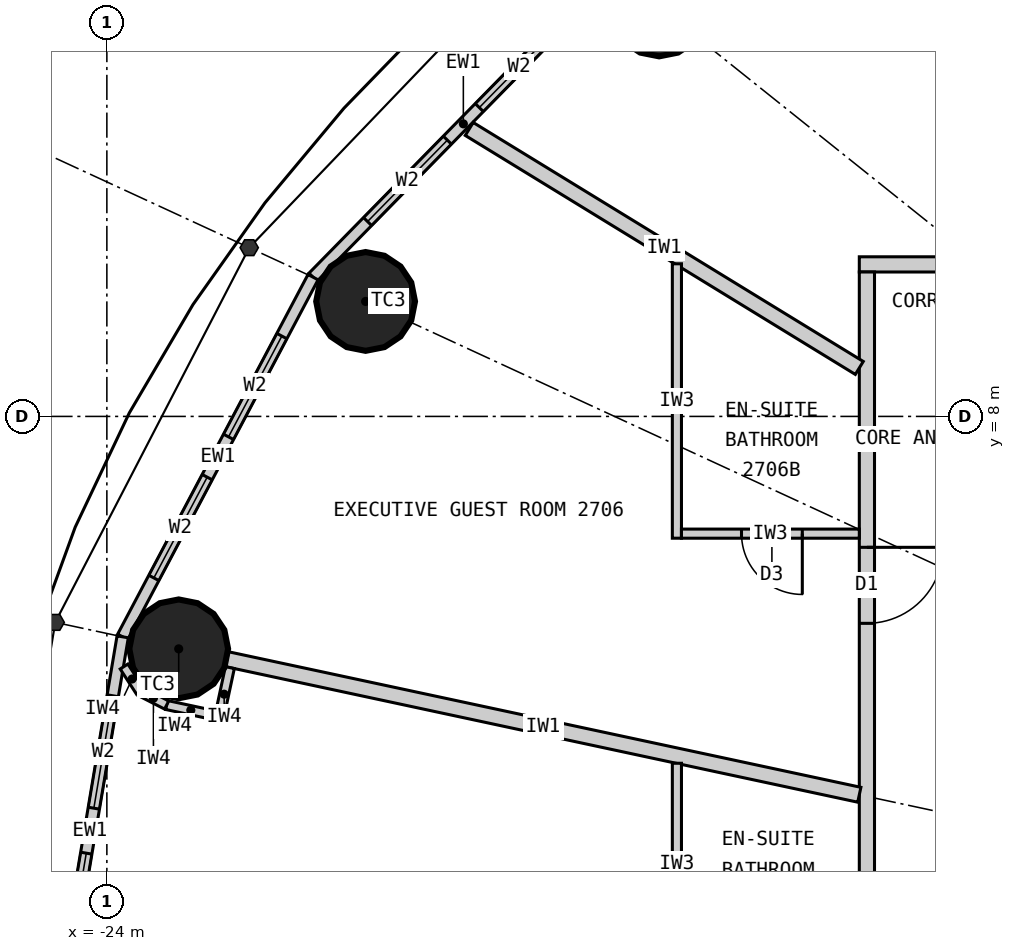
"""IFC4 building model, lengths in metres.
Left out: names, types, materials, properties, quantities, classifications, styles, units other than length and angle.
Written with IfcOpenShell. Run it as: python <this file> out.ifc"""

import sys

from ifc_helpers import new_model, si_unit, direction, frame, frame_2d, origin, origin_2d, place, context, subcontext, project, spatial, rectangle, circle, extrude, element, fill, save


model = new_model("IFC4")
c1 = context("Model", 3, precision=1e-05, world=origin(), true_north=direction((0.0, 1.0)))
c2 = subcontext(c1, "Body", "Model", "MODEL_VIEW")
j1 = project(units=[si_unit("LENGTHUNIT", "METRE"), si_unit("PLANEANGLEUNIT", "RADIAN")], contexts=[c1])
p1 = place(None, origin())
s1 = spatial("IfcSite", under=j1, at=p1, CompositionType="ELEMENT")
p2 = place(p1, origin())
s2 = spatial("IfcBuilding", under=s1, at=p2, CompositionType="ELEMENT")
p3 = place(p2, frame((0.0, 0.0, 108.9)))
s3 = spatial("IfcBuildingStorey", under=s2, at=p3, CompositionType="ELEMENT", Elevation=108.9)
for number, where, z_axis, x_axis in (
    (1, (-16.734, 13.387, 0.0), (0.0, 0.0, 1.0), (1.0, 0.0, 0.0)),
    (2, (-20.596, 9.513, 0.0), (0.0, 0.0, 1.0), (1.0, 0.0, 0.0)),
    (3, (-23.055, 4.942, 0.0), (0.0, 0.0, 1.0), (1.0, 0.0, 0.0)),
):
    element("IfcColumn", number, at=place(p3, frame(where, z_axis=z_axis, x_axis=x_axis)), inside=s3, PredefinedType="COLUMN", context=c2, shape_type="SweptSolid", body=[
        extrude(circle(Radius=0.65, at=origin_2d()), origin(), (0.0, 0.0, 1.0), 3.3),
    ])
p4 = place(p3, frame((-17.332, 13.866, 0.0), z_axis=(0.0, 0.0, 1.0), x_axis=(-0.700136650834, -0.714008872605, 0.0)))
e4 = element("IfcWall", 4, at=p4, inside=s3, PredefinedType="ELEMENTEDWALL", context=c2, shape_type="SweptSolid", body=[
    extrude(rectangle(XDim=5.649, YDim=0.15, at=frame_2d((2.825, 0.0))), origin(), (0.0, 0.0, 1.0), 3.12),
])
p5 = place(p4, frame((1.025, 0.0, 0.9)))
e5 = element("IfcOpeningElement", 5, at=p5, cuts=e4, PredefinedType="OPENING", context=c2, shape_type="SweptSolid", body=[
    extrude(rectangle(XDim=1.5, YDim=1.9, at=frame_2d((0.75, 0.95))), frame((0.0, 0.085, 0.0), z_axis=(0.0, -1.0, 0.0), x_axis=(1.0, 0.0, 0.0)), (0.0, 0.0, 1.0), 0.17),
])
p6 = place(p4, frame((3.125, 0.0, 0.9)))
e6 = element("IfcOpeningElement", 6, at=p6, cuts=e4, PredefinedType="OPENING", context=c2, shape_type="SweptSolid", body=[
    extrude(rectangle(XDim=1.5, YDim=1.9, at=frame_2d((0.75, 0.95))), frame((0.0, 0.085, 0.0), z_axis=(0.0, -1.0, 0.0), x_axis=(1.0, 0.0, 0.0)), (0.0, 0.0, 1.0), 0.17),
])
p7 = place(p3, frame((-21.287, 9.832, 0.0), z_axis=(0.0, 0.0, 1.0), x_axis=(-0.467814388454, -0.883826735257, 0.0)))
e7 = element("IfcWall", 7, at=p7, inside=s3, PredefinedType="ELEMENTEDWALL", context=c2, shape_type="SweptSolid", body=[
    extrude(rectangle(XDim=5.354, YDim=0.15, at=frame_2d((2.677, 0.0))), origin(), (0.0, 0.0, 1.0), 3.12),
])
p8 = place(p7, frame((0.877, 0.0, 0.9)))
e8 = element("IfcOpeningElement", 8, at=p8, cuts=e7, PredefinedType="OPENING", context=c2, shape_type="SweptSolid", body=[
    extrude(rectangle(XDim=1.5, YDim=1.9, at=frame_2d((0.75, 0.95))), frame((0.0, 0.085, 0.0), z_axis=(0.0, -1.0, 0.0), x_axis=(1.0, 0.0, 0.0)), (0.0, 0.0, 1.0), 0.17),
])
p9 = place(p7, frame((2.977, 0.0, 0.9)))
e9 = element("IfcOpeningElement", 9, at=p9, cuts=e7, PredefinedType="OPENING", context=c2, shape_type="SweptSolid", body=[
    extrude(rectangle(XDim=1.5, YDim=1.9, at=frame_2d((0.75, 0.95))), frame((0.0, 0.085, 0.0), z_axis=(0.0, -1.0, 0.0), x_axis=(1.0, 0.0, 0.0)), (0.0, 0.0, 1.0), 0.17),
])
p10 = place(p3, frame((-23.792, 5.1, 0.0), z_axis=(0.0, 0.0, 1.0), x_axis=(-0.165883894218, -0.986145290329, 0.0)))
e10 = element("IfcWall", 10, at=p10, inside=s3, PredefinedType="ELEMENTEDWALL", context=c2, shape_type="SweptSolid", body=[
    extrude(rectangle(XDim=5.172, YDim=0.15, at=frame_2d((2.586, 0.0))), origin(), (0.0, 0.0, 1.0), 3.12),
])
p11 = place(p10, frame((0.786, 0.0, 0.9)))
e11 = element("IfcOpeningElement", 11, at=p11, cuts=e10, PredefinedType="OPENING", context=c2, shape_type="SweptSolid", body=[
    extrude(rectangle(XDim=1.5, YDim=1.9, at=frame_2d((0.75, 0.95))), frame((0.0, 0.085, 0.0), z_axis=(0.0, -1.0, 0.0), x_axis=(1.0, 0.0, 0.0)), (0.0, 0.0, 1.0), 0.17),
])
p12 = place(p10, frame((2.886, 0.0, 0.9)))
e12 = element("IfcOpeningElement", 12, at=p12, cuts=e10, PredefinedType="OPENING", context=c2, shape_type="SweptSolid", body=[
    extrude(rectangle(XDim=1.5, YDim=1.9, at=frame_2d((0.75, 0.95))), frame((0.0, 0.085, 0.0), z_axis=(0.0, -1.0, 0.0), x_axis=(1.0, 0.0, 0.0)), (0.0, 0.0, 1.0), 0.17),
])
p13 = place(p3, frame((-14.1, 10.0, 0.0), z_axis=(0.0, 0.0, 1.0), x_axis=(1.0, 0.0, 0.0)))
e13 = element("IfcWall", 13, at=p13, inside=s3, PredefinedType="PARTITIONING", context=c2, shape_type="SweptSolid", body=[
    extrude(rectangle(XDim=12.535, YDim=0.2, at=frame_2d((6.268, 0.0))), origin(), (0.0, 0.0, 1.0), 3.12),
])
p14 = place(p13, frame((2.801, 0.0, 0.0)))
e14 = element("IfcOpeningElement", 14, at=p14, cuts=e13, PredefinedType="OPENING", context=c2, shape_type="SweptSolid", body=[
    extrude(rectangle(XDim=1.0, YDim=2.2, at=frame_2d((0.5, 1.1))), frame((0.0, 0.11, 0.0), z_axis=(0.0, -1.0, 0.0), x_axis=(1.0, 0.0, 0.0)), (0.0, 0.0, 1.0), 0.22),
])
p15 = place(p3, frame((-14.0, 9.9, 0.0), z_axis=(0.0, 0.0, 1.0), x_axis=(0.0, -1.0, 0.0)))
e15 = element("IfcWall", 15, at=p15, inside=s3, PredefinedType="PARTITIONING", context=c2, shape_type="SweptSolid", body=[
    extrude(rectangle(XDim=19.8, YDim=0.2, at=frame_2d((9.9, 0.0))), origin(), (0.0, 0.0, 1.0), 3.12),
])
p16 = place(p15, frame((3.622, 0.0, 0.0)))
e16 = element("IfcOpeningElement", 16, at=p16, cuts=e15, PredefinedType="OPENING", context=c2, shape_type="SweptSolid", body=[
    extrude(rectangle(XDim=1.0, YDim=2.2, at=frame_2d((0.5, 1.1))), frame((0.0, 0.11, 0.0), z_axis=(0.0, -1.0, 0.0), x_axis=(1.0, 0.0, 0.0)), (0.0, 0.0, 1.0), 0.22),
])
p17 = place(p15, frame((9.238, 0.0, 0.0)))
e17 = element("IfcOpeningElement", 17, at=p17, cuts=e15, PredefinedType="OPENING", context=c2, shape_type="SweptSolid", body=[
    extrude(rectangle(XDim=1.0, YDim=2.2, at=frame_2d((0.5, 1.1))), frame((0.0, 0.11, 0.0), z_axis=(0.0, -1.0, 0.0), x_axis=(1.0, 0.0, 0.0)), (0.0, 0.0, 1.0), 0.22),
])
p18 = place(p15, frame((13.742, 0.0, 0.0)))
e18 = element("IfcOpeningElement", 18, at=p18, cuts=e15, PredefinedType="OPENING", context=c2, shape_type="SweptSolid", body=[
    extrude(rectangle(XDim=1.0, YDim=2.2, at=frame_2d((0.5, 1.1))), frame((0.0, 0.11, 0.0), z_axis=(0.0, -1.0, 0.0), x_axis=(1.0, 0.0, 0.0)), (0.0, 0.0, 1.0), 0.22),
])
p19 = place(p15, frame((18.698, 0.0, 0.0)))
e19 = element("IfcOpeningElement", 19, at=p19, cuts=e15, PredefinedType="OPENING", context=c2, shape_type="SweptSolid", body=[
    extrude(rectangle(XDim=1.0, YDim=2.2, at=frame_2d((0.5, 1.1))), frame((0.0, 0.11, 0.0), z_axis=(0.0, -1.0, 0.0), x_axis=(1.0, 0.0, 0.0)), (0.0, 0.0, 1.0), 0.22),
])
p20 = place(p3, frame((-14.1, 8.638, 0.0), z_axis=(0.0, 0.0, 1.0), x_axis=(-0.852706758009, 0.5223898782, 0.0)))
e20 = element("IfcWall", 20, at=p20, inside=s3, PredefinedType="PARTITIONING", context=c2, shape_type="SweptSolid", body=[
    extrude(rectangle(XDim=6.019, YDim=0.2, at=frame_2d((3.009, 0.0))), origin(), (0.0, 0.0, 1.0), 3.12),
])
p21 = place(p3, frame((-14.1, 3.022, 0.0), z_axis=(0.0, 0.0, 1.0), x_axis=(-0.977783513367, 0.209617272638, 0.0)))
e21 = element("IfcWall", 21, at=p21, inside=s3, PredefinedType="PARTITIONING", context=c2, shape_type="SweptSolid", body=[
    extrude(rectangle(XDim=8.508, YDim=0.2, at=frame_2d((4.254, 0.0))), origin(), (0.0, 0.0, 1.0), 2.37),
])
p22 = place(p3, frame((-16.5, 10.008, 0.0), z_axis=(0.0, 0.0, 1.0), x_axis=(0.0, -1.0, 0.0)))
e22 = element("IfcWall", 22, at=p22, inside=s3, PredefinedType="PARTITIONING", context=c2, shape_type="SweptSolid", body=[
    extrude(rectangle(XDim=3.61, YDim=0.12, at=frame_2d((1.805, 0.0))), origin(), (0.0, 0.0, 1.0), 3.12),
])
p23 = place(p3, frame((-14.1, 6.458, 0.0), z_axis=(0.0, 0.0, 1.0), x_axis=(-1.0, 0.0, 0.0)))
e23 = element("IfcWall", 23, at=p23, inside=s3, PredefinedType="PARTITIONING", context=c2, shape_type="SweptSolid", body=[
    extrude(rectangle(XDim=2.34, YDim=0.12, at=frame_2d((1.17, 0.0))), origin(), (0.0, 0.0, 1.0), 3.12),
])
p24 = place(p23, frame((0.75, 0.0, 0.0)))
e24 = element("IfcOpeningElement", 24, at=p24, cuts=e23, PredefinedType="OPENING", context=c2, shape_type="SweptSolid", body=[
    extrude(rectangle(XDim=0.8, YDim=2.1, at=frame_2d((0.4, 1.05))), frame((0.0, 0.07, 0.0), z_axis=(0.0, -1.0, 0.0), x_axis=(1.0, 0.0, 0.0)), (0.0, 0.0, 1.0), 0.14),
])
p25 = place(p3, frame((-16.5, 3.437, 0.0), z_axis=(0.0, 0.0, 1.0), x_axis=(0.0, -1.0, 0.0)))
e25 = element("IfcWall", 25, at=p25, inside=s3, PredefinedType="PARTITIONING", context=c2, shape_type="SweptSolid", body=[
    extrude(rectangle(XDim=2.655, YDim=0.12, at=frame_2d((1.327, 0.0))), origin(), (0.0, 0.0, 1.0), 3.12),
])
p26 = place(p3, frame((-22.382, 4.695, 0.0), z_axis=(0.0, 0.0, 1.0), x_axis=(-0.209808658628, -0.977742464438, 0.0)))
e26 = element("IfcWall", 26, at=p26, inside=s3, PredefinedType="PARTITIONING", context=c2, shape_type="SweptSolid", body=[
    extrude(rectangle(XDim=0.716, YDim=0.12, at=frame_2d((0.358, 0.0))), origin(), (0.0, 0.0, 1.0), 3.12),
])
p27 = place(p3, frame((-22.578, 4.067, 0.0), z_axis=(0.0, 0.0, 1.0), x_axis=(-0.977802414077, 0.209529088731, 0.0)))
e27 = element("IfcWall", 27, at=p27, inside=s3, PredefinedType="PARTITIONING", context=c2, shape_type="SweptSolid", body=[
    extrude(rectangle(XDim=0.65, YDim=0.12, at=frame_2d((0.325, 0.0))), origin(), (0.0, 0.0, 1.0), 3.12),
])
for number, where, z_axis, x_axis in (
    (28, (-23.213, 4.203, 0.0), (0.0, 0.0, 1.0), (-0.89, 0.456, 0.0)),
    (29, (-23.562, 4.381, 0.0), (0.0, 0.0, 1.0), (-0.543, 0.84, 0.0)),
):
    element("IfcWall", number, at=place(p3, frame(where, z_axis=z_axis, x_axis=x_axis)), inside=s3, PredefinedType="PARTITIONING", context=c2, shape_type="SweptSolid", body=[
        extrude(rectangle(XDim=0.391, YDim=0.12, at=frame_2d((0.196, 0.0))), origin(), (0.0, 0.0, 1.0), 3.12),
    ])
p28 = place(p5, origin())
e30 = element("IfcWindow", 30, at=p28, inside=s3, PartitioningType="SINGLE_PANEL", PredefinedType="WINDOW", context=c2, shape_type="SweptSolid", body=[
    extrude(rectangle(XDim=1.5, YDim=1.9, at=frame_2d((0.75, 0.95))), frame((0.0, 0.03, 0.0), z_axis=(0.0, -1.0, 0.0), x_axis=(1.0, 0.0, 0.0)), (0.0, 0.0, 1.0), 0.06),
])
fill(e5, e30)
p29 = place(p6, origin())
e31 = element("IfcWindow", 31, at=p29, inside=s3, PartitioningType="SINGLE_PANEL", PredefinedType="WINDOW", context=c2, shape_type="SweptSolid", body=[
    extrude(rectangle(XDim=1.5, YDim=1.9, at=frame_2d((0.75, 0.95))), frame((0.0, 0.03, 0.0), z_axis=(0.0, -1.0, 0.0), x_axis=(1.0, 0.0, 0.0)), (0.0, 0.0, 1.0), 0.06),
])
fill(e6, e31)
p30 = place(p8, origin())
e32 = element("IfcWindow", 32, at=p30, inside=s3, PartitioningType="SINGLE_PANEL", PredefinedType="WINDOW", context=c2, shape_type="SweptSolid", body=[
    extrude(rectangle(XDim=1.5, YDim=1.9, at=frame_2d((0.75, 0.95))), frame((0.0, 0.03, 0.0), z_axis=(0.0, -1.0, 0.0), x_axis=(1.0, 0.0, 0.0)), (0.0, 0.0, 1.0), 0.06),
])
fill(e8, e32)
p31 = place(p9, origin())
e33 = element("IfcWindow", 33, at=p31, inside=s3, PartitioningType="SINGLE_PANEL", PredefinedType="WINDOW", context=c2, shape_type="SweptSolid", body=[
    extrude(rectangle(XDim=1.5, YDim=1.9, at=frame_2d((0.75, 0.95))), frame((0.0, 0.03, 0.0), z_axis=(0.0, -1.0, 0.0), x_axis=(1.0, 0.0, 0.0)), (0.0, 0.0, 1.0), 0.06),
])
fill(e9, e33)
p32 = place(p11, origin())
e34 = element("IfcWindow", 34, at=p32, inside=s3, PartitioningType="SINGLE_PANEL", PredefinedType="WINDOW", context=c2, shape_type="SweptSolid", body=[
    extrude(rectangle(XDim=1.5, YDim=1.9, at=frame_2d((0.75, 0.95))), frame((0.0, 0.03, 0.0), z_axis=(0.0, -1.0, 0.0), x_axis=(1.0, 0.0, 0.0)), (0.0, 0.0, 1.0), 0.06),
])
fill(e11, e34)
p33 = place(p12, origin())
e35 = element("IfcWindow", 35, at=p33, inside=s3, PartitioningType="SINGLE_PANEL", PredefinedType="WINDOW", context=c2, shape_type="SweptSolid", body=[
    extrude(rectangle(XDim=1.5, YDim=1.9, at=frame_2d((0.75, 0.95))), frame((0.0, 0.03, 0.0), z_axis=(0.0, -1.0, 0.0), x_axis=(1.0, 0.0, 0.0)), (0.0, 0.0, 1.0), 0.06),
])
fill(e12, e35)
p34 = place(p24, origin())
e36 = element("IfcDoor", 36, at=p34, inside=s3, OperationType="SINGLE_SWING_LEFT", PredefinedType="DOOR", context=c2, shape_type="SweptSolid", body=[
    extrude(rectangle(XDim=0.8, YDim=2.1, at=frame_2d((0.4, 1.05))), frame((0.0, 0.025, 0.0), z_axis=(0.0, -1.0, 0.0), x_axis=(1.0, 0.0, 0.0)), (0.0, 0.0, 1.0), 0.05),
])
fill(e24, e36)
p35 = place(p16, origin())
e37 = element("IfcDoor", 37, at=p35, inside=s3, OperationType="SINGLE_SWING_LEFT", PredefinedType="DOOR", context=c2, shape_type="SweptSolid", body=[
    extrude(rectangle(XDim=1.0, YDim=2.2, at=frame_2d((0.5, 1.1))), frame((0.0, 0.025, 0.0), z_axis=(0.0, -1.0, 0.0), x_axis=(1.0, 0.0, 0.0)), (0.0, 0.0, 1.0), 0.05),
])
fill(e16, e37)
save(model, sys.argv[1])
